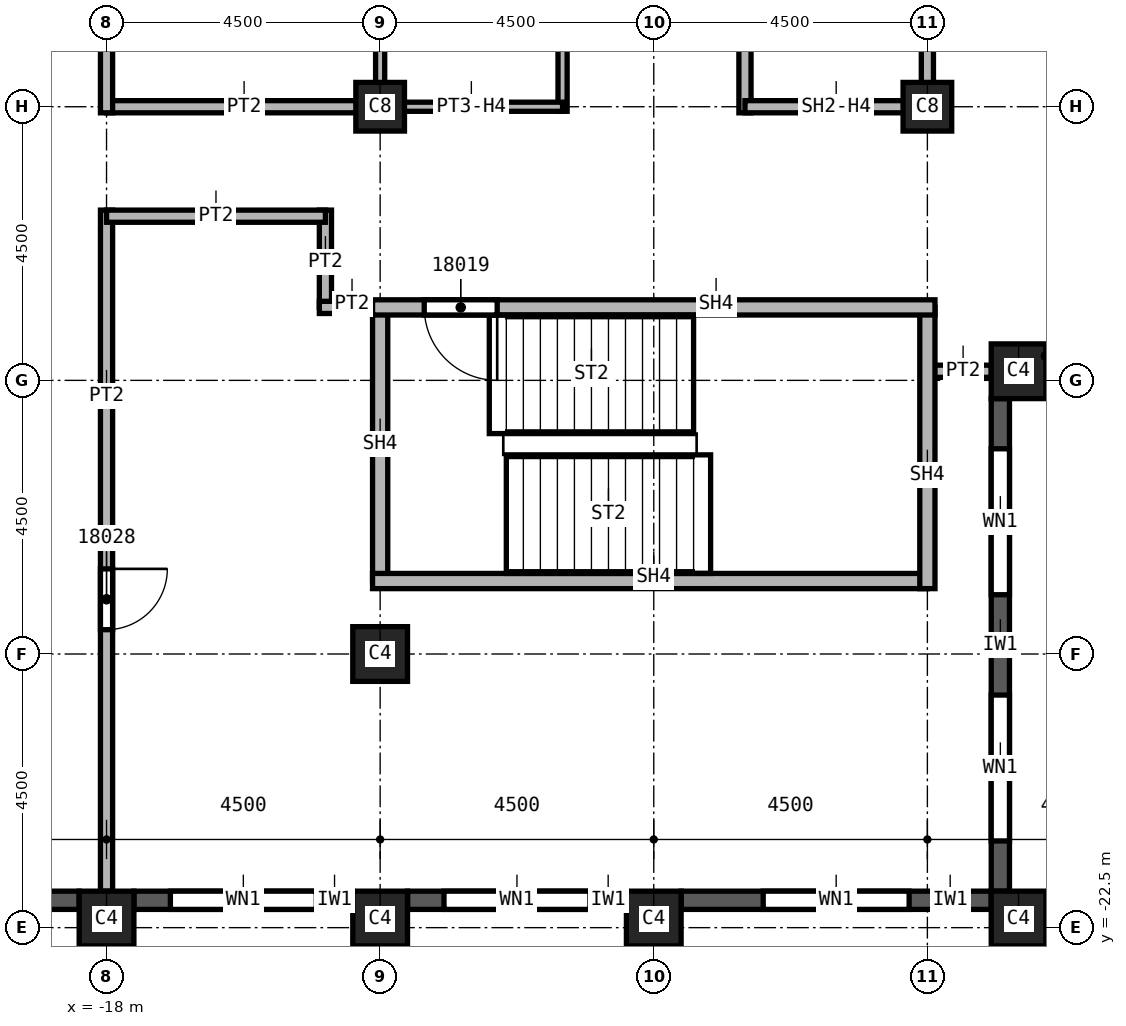
"""IFC4 building model, lengths in metres.
Left out: names, types, materials, properties, quantities, classifications, styles, units other than length and angle.
Written with IfcOpenShell. Run it as: python <this file> out.ifc"""

import sys

from ifc_helpers import new_model, si_unit, direction, frame, frame_2d, origin, origin_2d, place, context, subcontext, project, spatial, rectangle, extrude, element, fill, save


model = new_model("IFC4")
c1 = context("Model", 3, precision=1e-05, world=origin(), true_north=direction((0.0, 1.0)))
c2 = subcontext(c1, "Body", "Model", "MODEL_VIEW")
j1 = project(units=[si_unit("LENGTHUNIT", "METRE"), si_unit("PLANEANGLEUNIT", "RADIAN")], contexts=[c1])
p1 = place(None, origin())
s1 = spatial("IfcSite", under=j1, at=p1, CompositionType="ELEMENT")
p2 = place(p1, origin())
s2 = spatial("IfcBuilding", under=s1, at=p2, CompositionType="ELEMENT")
p3 = place(p2, frame((0.0, 0.0, 266.0)))
s3 = spatial("IfcBuildingStorey", under=s2, at=p3, CompositionType="ELEMENT", Elevation=266.0)
p4 = place(p3, frame((-13.5, -18.0, 0.0), z_axis=(0.0, 0.0, 1.0), x_axis=(1.0, 0.0, 0.0)))
e1 = element("IfcColumn", 1, at=p4, inside=s3, PredefinedType="COLUMN", context=c2, shape_type="SweptSolid", body=[
    extrude(rectangle(XDim=0.9, YDim=0.9, at=origin_2d()), origin(), (0.0, 0.0, 1.0), 3.72),
])
for number, where, z_axis, x_axis in (
    (2, (-4.5, -9.0, 0.0), (0.0, 0.0, 1.0), (1.0, 0.0, 0.0)),
    (3, (-13.5, -9.0, 0.0), (0.0, 0.0, 1.0), (1.0, 0.0, 0.0)),
):
    element("IfcColumn", number, at=place(p3, frame(where, z_axis=z_axis, x_axis=x_axis)), inside=s3, PredefinedType="COLUMN", context=c2, shape_type="SweptSolid", body=[
        extrude(rectangle(XDim=0.8, YDim=0.8, at=origin_2d()), origin(), (0.0, 0.0, 1.0), 3.72),
    ])
for number, where, z_axis, x_axis in (
    (4, (-3.0, -22.35, 0.0), (0.0, 0.0, 1.0), (1.0, 0.0, 0.0)),
    (5, (-9.0, -22.35, 0.0), (0.0, 0.0, 1.0), (1.0, 0.0, 0.0)),
    (6, (-13.5, -22.35, 0.0), (0.0, 0.0, 1.0), (1.0, 0.0, 0.0)),
    (7, (-18.0, -22.35, 0.0), (0.0, 0.0, 1.0), (1.0, 0.0, 0.0)),
    (8, (-3.0, -13.35, 0.0), (0.0, 0.0, 1.0), (1.0, 0.0, 0.0)),
):
    element("IfcColumn", number, at=place(p3, frame(where, z_axis=z_axis, x_axis=x_axis)), inside=s3, PredefinedType="COLUMN", context=c2, shape_type="SweptSolid", body=[
        extrude(rectangle(XDim=0.9, YDim=0.9, at=origin_2d()), origin(), (0.0, 0.0, 1.0), 3.72),
    ])
p5 = place(p3, frame((-22.05, -22.05, 0.0), z_axis=(0.0, 0.0, 1.0), x_axis=(1.0, 0.0, 0.0)))
e9 = element("IfcWall", 9, at=p5, inside=s3, PredefinedType="SOLIDWALL", context=c2, shape_type="SweptSolid", body=[
    extrude(rectangle(XDim=3.6, YDim=0.3, at=frame_2d((1.8, 0.0))), origin(), (0.0, 0.0, 1.0), 3.12),
])
p6 = place(p5, frame((0.775, 0.0, 0.8)))
e10 = element("IfcOpeningElement", 10, at=p6, cuts=e9, PredefinedType="OPENING", context=c2, shape_type="SweptSolid", body=[
    extrude(rectangle(XDim=1.0, YDim=1.95, at=frame_2d((0.5, 0.975))), frame((0.0, 0.15, 0.0), z_axis=(0.0, -1.0, 0.0), x_axis=(1.0, 0.0, 0.0)), (0.0, 0.0, 1.0), 0.3),
])
p7 = place(p5, frame((2.375, 0.0, 0.8)))
e11 = element("IfcOpeningElement", 11, at=p7, cuts=e9, PredefinedType="OPENING", context=c2, shape_type="SweptSolid", body=[
    extrude(rectangle(XDim=0.6, YDim=1.95, at=frame_2d((0.3, 0.975))), frame((0.0, 0.15, 0.0), z_axis=(0.0, -1.0, 0.0), x_axis=(1.0, 0.0, 0.0)), (0.0, 0.0, 1.0), 0.3),
])
p8 = place(p3, frame((-17.55, -22.05, 0.0), z_axis=(0.0, 0.0, 1.0), x_axis=(1.0, 0.0, 0.0)))
e12 = element("IfcWall", 12, at=p8, inside=s3, PredefinedType="SOLIDWALL", context=c2, shape_type="SweptSolid", body=[
    extrude(rectangle(XDim=3.6, YDim=0.3, at=frame_2d((1.8, 0.0))), origin(), (0.0, 0.0, 1.0), 3.12),
])
p9 = place(p8, frame((0.6, 0.0, 0.8)))
e13 = element("IfcOpeningElement", 13, at=p9, cuts=e12, PredefinedType="OPENING", context=c2, shape_type="SweptSolid", body=[
    extrude(rectangle(XDim=2.4, YDim=1.95, at=frame_2d((1.2, 0.975))), frame((0.0, 0.15, 0.0), z_axis=(0.0, -1.0, 0.0), x_axis=(1.0, 0.0, 0.0)), (0.0, 0.0, 1.0), 0.3),
])
p10 = place(p3, frame((-13.05, -22.05, 0.0), z_axis=(0.0, 0.0, 1.0), x_axis=(1.0, 0.0, 0.0)))
e14 = element("IfcWall", 14, at=p10, inside=s3, PredefinedType="SOLIDWALL", context=c2, shape_type="SweptSolid", body=[
    extrude(rectangle(XDim=3.6, YDim=0.3, at=frame_2d((1.8, 0.0))), origin(), (0.0, 0.0, 1.0), 3.12),
])
p11 = place(p10, frame((0.6, 0.0, 0.8)))
e15 = element("IfcOpeningElement", 15, at=p11, cuts=e14, PredefinedType="OPENING", context=c2, shape_type="SweptSolid", body=[
    extrude(rectangle(XDim=2.4, YDim=1.95, at=frame_2d((1.2, 0.975))), frame((0.0, 0.15, 0.0), z_axis=(0.0, -1.0, 0.0), x_axis=(1.0, 0.0, 0.0)), (0.0, 0.0, 1.0), 0.3),
])
p12 = place(p3, frame((-8.55, -22.05, 0.0), z_axis=(0.0, 0.0, 1.0), x_axis=(1.0, 0.0, 0.0)))
e16 = element("IfcWall", 16, at=p12, inside=s3, PredefinedType="SOLIDWALL", context=c2, shape_type="SweptSolid", body=[
    extrude(rectangle(XDim=5.1, YDim=0.3, at=frame_2d((2.55, 0.0))), origin(), (0.0, 0.0, 1.0), 3.12),
])
p13 = place(p12, frame((1.35, 0.0, 0.8)))
e17 = element("IfcOpeningElement", 17, at=p13, cuts=e16, PredefinedType="OPENING", context=c2, shape_type="SweptSolid", body=[
    extrude(rectangle(XDim=2.4, YDim=1.95, at=frame_2d((1.2, 0.975))), frame((0.0, 0.15, 0.0), z_axis=(0.0, -1.0, 0.0), x_axis=(1.0, 0.0, 0.0)), (0.0, 0.0, 1.0), 0.3),
])
p14 = place(p3, frame((-3.3, -21.9, 0.0), z_axis=(0.0, 0.0, 1.0), x_axis=(0.0, 1.0, 0.0)))
e18 = element("IfcWall", 18, at=p14, inside=s3, PredefinedType="SOLIDWALL", context=c2, shape_type="SweptSolid", body=[
    extrude(rectangle(XDim=8.1, YDim=0.3, at=frame_2d((4.05, 0.0))), origin(), (0.0, 0.0, 1.0), 3.12),
])
p15 = place(p14, frame((0.825, 0.0, 0.8)))
e19 = element("IfcOpeningElement", 19, at=p15, cuts=e18, PredefinedType="OPENING", context=c2, shape_type="SweptSolid", body=[
    extrude(rectangle(XDim=2.4, YDim=1.95, at=frame_2d((1.2, 0.975))), frame((0.0, 0.15, 0.0), z_axis=(0.0, -1.0, 0.0), x_axis=(1.0, 0.0, 0.0)), (0.0, 0.0, 1.0), 0.3),
])
p16 = place(p14, frame((4.875, 0.0, 0.8)))
e20 = element("IfcOpeningElement", 20, at=p16, cuts=e18, PredefinedType="OPENING", context=c2, shape_type="SweptSolid", body=[
    extrude(rectangle(XDim=2.4, YDim=1.95, at=frame_2d((1.2, 0.975))), frame((0.0, 0.15, 0.0), z_axis=(0.0, -1.0, 0.0), x_axis=(1.0, 0.0, 0.0)), (0.0, 0.0, 1.0), 0.3),
])
p17 = place(p3, frame((-18.0, -10.7, 0.0), z_axis=(0.0, 0.0, 1.0), x_axis=(0.0, -1.0, 0.0)))
e21 = element("IfcWall", 21, at=p17, inside=s3, PredefinedType="PARTITIONING", context=c2, shape_type="SweptSolid", body=[
    extrude(rectangle(XDim=11.2, YDim=0.2, at=frame_2d((5.6, 0.0))), origin(), (0.0, 0.0, 1.0), 3.72),
])
p18 = place(p17, frame((5.9, 0.0, 0.0)))
e22 = element("IfcOpeningElement", 22, at=p18, cuts=e21, PredefinedType="OPENING", context=c2, shape_type="SweptSolid", body=[
    extrude(rectangle(XDim=1.0, YDim=2.1, at=frame_2d((0.5, 1.05))), frame((0.0, 0.1, 0.0), z_axis=(0.0, -1.0, 0.0), x_axis=(1.0, 0.0, 0.0)), (0.0, 0.0, 1.0), 0.2),
])
p19 = place(p3, frame((-18.0, -9.0, 0.0), z_axis=(0.0, 0.0, 1.0), x_axis=(1.0, 0.0, 0.0)))
e23 = element("IfcWall", 23, at=p19, inside=s3, PredefinedType="PARTITIONING", context=c2, shape_type="SweptSolid", body=[
    extrude(rectangle(XDim=4.5, YDim=0.2, at=frame_2d((2.25, 0.0))), origin(), (0.0, 0.0, 1.0), 3.72),
])
p20 = place(p3, frame((-18.0, 9.1, 0.0), z_axis=(0.0, 0.0, 1.0), x_axis=(0.0, -1.0, 0.0)))
e24 = element("IfcWall", 24, at=p20, inside=s3, PredefinedType="PARTITIONING", context=c2, shape_type="SweptSolid", body=[
    extrude(rectangle(XDim=18.2, YDim=0.2, at=frame_2d((9.1, 0.0))), origin(), (0.0, 0.0, 1.0), 3.72),
])
p21 = place(p20, frame((12.25, 0.0, 0.0)))
e25 = element("IfcOpeningElement", 25, at=p21, cuts=e24, PredefinedType="OPENING", context=c2, shape_type="SweptSolid", body=[
    extrude(rectangle(XDim=1.0, YDim=2.1, at=frame_2d((0.5, 1.05))), frame((0.0, 0.1, 0.0), z_axis=(0.0, -1.0, 0.0), x_axis=(1.0, 0.0, 0.0)), (0.0, 0.0, 1.0), 0.2),
])
p22 = place(p20, frame((2.35, 0.0, 0.0)))
e26 = element("IfcOpeningElement", 26, at=p22, cuts=e24, PredefinedType="OPENING", context=c2, shape_type="SweptSolid", body=[
    extrude(rectangle(XDim=1.0, YDim=2.1, at=frame_2d((0.5, 1.05))), frame((0.0, 0.1, 0.0), z_axis=(0.0, -1.0, 0.0), x_axis=(1.0, 0.0, 0.0)), (0.0, 0.0, 1.0), 0.2),
])
p23 = place(p3, frame((-14.4, -12.3, 0.0), z_axis=(0.0, 0.0, 1.0), x_axis=(0.0, 1.0, 0.0)))
e27 = element("IfcWall", 27, at=p23, inside=s3, PredefinedType="PARTITIONING", context=c2, shape_type="SweptSolid", body=[
    extrude(rectangle(XDim=1.6, YDim=0.2, at=frame_2d((0.8, 0.0))), origin(), (0.0, 0.0, 1.0), 3.72),
])
p24 = place(p3, frame((-14.4, -10.8, 0.0), z_axis=(0.0, 0.0, 1.0), x_axis=(-1.0, 0.0, 0.0)))
e28 = element("IfcWall", 28, at=p24, inside=s3, PredefinedType="PARTITIONING", context=c2, shape_type="SweptSolid", body=[
    extrude(rectangle(XDim=3.6, YDim=0.2, at=frame_2d((1.8, 0.0))), origin(), (0.0, 0.0, 1.0), 3.72),
])
p25 = place(p3, frame((-13.375, -12.3, 0.0), z_axis=(0.0, 0.0, 1.0), x_axis=(-1.0, 0.0, 0.0)))
e29 = element("IfcWall", 29, at=p25, inside=s3, PredefinedType="PARTITIONING", context=c2, shape_type="SweptSolid", body=[
    extrude(rectangle(XDim=1.125, YDim=0.2, at=frame_2d((0.562, 0.0))), origin(), (0.0, 0.0, 1.0), 3.72),
])
p26 = place(p3, frame((-3.45, -13.35, 0.0), z_axis=(0.0, 0.0, 1.0), x_axis=(-1.0, 0.0, 0.0)))
e30 = element("IfcWall", 30, at=p26, inside=s3, PredefinedType="PARTITIONING", context=c2, shape_type="SweptSolid", body=[
    extrude(rectangle(XDim=1.05, YDim=0.2, at=frame_2d((0.525, 0.0))), origin(), (0.0, 0.0, 1.0), 3.72),
])
p27 = place(p3, frame((-7.5, -9.1, 0.0), z_axis=(0.0, 0.0, 1.0), x_axis=(0.0, 1.0, 0.0)))
e31 = element("IfcWall", 31, at=p27, inside=s3, PredefinedType="SOLIDWALL", context=c2, shape_type="SweptSolid", body=[
    extrude(rectangle(XDim=6.225, YDim=0.2, at=frame_2d((3.113, 0.0))), origin(), (0.0, 0.0, 1.0), 3.72),
])
p28 = place(p3, frame((-4.5, -9.0, 0.0), z_axis=(0.0, 0.0, 1.0), x_axis=(-1.0, 0.0, 0.0)))
e32 = element("IfcWall", 32, at=p28, inside=s3, PredefinedType="SOLIDWALL", context=c2, shape_type="SweptSolid", body=[
    extrude(rectangle(XDim=3.0, YDim=0.2, at=frame_2d((1.5, 0.0))), origin(), (0.0, 0.0, 1.0), 3.042),
])
p29 = place(p3, frame((-4.5, 0.0, 0.0), z_axis=(0.0, 0.0, 1.0), x_axis=(0.0, -1.0, 0.0)))
e33 = element("IfcWall", 33, at=p29, inside=s3, PredefinedType="SOLIDWALL", context=c2, shape_type="SweptSolid", body=[
    extrude(rectangle(XDim=9.1, YDim=0.2, at=frame_2d((4.55, 0.0))), origin(), (0.0, 0.0, 1.0), 3.042),
])
p30 = place(p29, frame((3.25, 0.0, 0.0)))
e34 = element("IfcOpeningElement", 34, at=p30, cuts=e33, PredefinedType="OPENING", context=c2, shape_type="SweptSolid", body=[
    extrude(rectangle(XDim=1.1, YDim=2.1, at=frame_2d((0.55, 1.05))), frame((0.0, 0.1, 0.0), z_axis=(0.0, -1.0, 0.0), x_axis=(1.0, 0.0, 0.0)), (0.0, 0.0, 1.0), 0.2),
])
p31 = place(p29, frame((1.6, 0.0, 0.0)))
e35 = element("IfcOpeningElement", 35, at=p31, cuts=e33, PredefinedType="OPENING", context=c2, shape_type="SweptSolid", body=[
    extrude(rectangle(XDim=1.1, YDim=2.1, at=frame_2d((0.55, 1.05))), frame((0.0, 0.1, 0.0), z_axis=(0.0, -1.0, 0.0), x_axis=(1.0, 0.0, 0.0)), (0.0, 0.0, 1.0), 0.2),
])
p32 = place(p3, frame((-13.5, -16.8, 0.0), z_axis=(0.0, 0.0, 1.0), x_axis=(0.0, 1.0, 0.0)))
e36 = element("IfcWall", 36, at=p32, inside=s3, PredefinedType="SOLIDWALL", context=c2, shape_type="SweptSolid", body=[
    extrude(rectangle(XDim=4.5, YDim=0.25, at=frame_2d((2.25, 0.0))), origin(), (0.0, 0.0, 1.0), 3.72),
])
p33 = place(p3, frame((-4.5, -16.8, 0.0), z_axis=(0.0, 0.0, 1.0), x_axis=(-1.0, 0.0, 0.0)))
e37 = element("IfcWall", 37, at=p33, inside=s3, PredefinedType="SOLIDWALL", context=c2, shape_type="SweptSolid", body=[
    extrude(rectangle(XDim=9.125, YDim=0.25, at=frame_2d((4.562, 0.0))), origin(), (0.0, 0.0, 1.0), 3.72),
])
p34 = place(p3, frame((-4.5, -12.3, 0.0), z_axis=(0.0, 0.0, 1.0), x_axis=(0.0, -1.0, 0.0)))
e38 = element("IfcWall", 38, at=p34, inside=s3, PredefinedType="SOLIDWALL", context=c2, shape_type="SweptSolid", body=[
    extrude(rectangle(XDim=4.625, YDim=0.25, at=frame_2d((2.312, 0.0))), origin(), (0.0, 0.0, 1.0), 3.72),
])
p35 = place(p3, frame((-4.375, -12.3, 0.0), z_axis=(0.0, 0.0, 1.0), x_axis=(-1.0, 0.0, 0.0)))
e39 = element("IfcWall", 39, at=p35, inside=s3, PredefinedType="SOLIDWALL", context=c2, shape_type="SweptSolid", body=[
    extrude(rectangle(XDim=9.25, YDim=0.25, at=frame_2d((4.625, 0.0))), origin(), (0.0, 0.0, 1.0), 3.72),
])
p36 = place(p35, frame((7.2, 0.0, 0.0)))
e40 = element("IfcOpeningElement", 40, at=p36, cuts=e39, PredefinedType="OPENING", context=c2, shape_type="SweptSolid", body=[
    extrude(rectangle(XDim=1.2, YDim=2.1, at=frame_2d((0.6, 1.05))), frame((0.0, 0.125, 0.0), z_axis=(0.0, -1.0, 0.0), x_axis=(1.0, 0.0, 0.0)), (0.0, 0.0, 1.0), 0.25),
])
p37 = place(p3, frame((-13.5, -9.1, 0.0), z_axis=(0.0, 0.0, 1.0), x_axis=(0.0, 1.0, 0.0)))
e41 = element("IfcWall", 41, at=p37, inside=s3, PredefinedType="PARTITIONING", context=c2, shape_type="SweptSolid", body=[
    extrude(rectangle(XDim=4.6, YDim=0.15, at=frame_2d((2.3, 0.0))), origin(), (0.0, 0.0, 1.0), 3.042),
])
p38 = place(p3, frame((-10.5, -9.075, 0.0), z_axis=(0.0, 0.0, 1.0), x_axis=(0.0, 1.0, 0.0)))
e42 = element("IfcWall", 42, at=p38, inside=s3, PredefinedType="PARTITIONING", context=c2, shape_type="SweptSolid", body=[
    extrude(rectangle(XDim=4.65, YDim=0.15, at=frame_2d((2.325, 0.0))), origin(), (0.0, 0.0, 1.0), 3.72),
])
p39 = place(p38, frame((2.8, 0.0, 0.0)))
e43 = element("IfcOpeningElement", 43, at=p39, cuts=e42, PredefinedType="OPENING", context=c2, shape_type="SweptSolid", body=[
    extrude(rectangle(XDim=0.9, YDim=2.1, at=frame_2d((0.45, 1.05))), frame((0.0, 0.075, 0.0), z_axis=(0.0, -1.0, 0.0), x_axis=(1.0, 0.0, 0.0)), (0.0, 0.0, 1.0), 0.15),
])
p40 = place(p3, frame((-10.5, -9.0, 0.0), z_axis=(0.0, 0.0, 1.0), x_axis=(-1.0, 0.0, 0.0)))
e44 = element("IfcWall", 44, at=p40, inside=s3, PredefinedType="PARTITIONING", context=c2, shape_type="SweptSolid", body=[
    extrude(rectangle(XDim=3.075, YDim=0.15, at=frame_2d((1.538, 0.0))), origin(), (0.0, 0.0, 1.0), 3.042),
])
p41 = place(p9, origin())
e45 = element("IfcWindow", 45, at=p41, inside=s3, PartitioningType="SINGLE_PANEL", PredefinedType="WINDOW", context=c2, shape_type="SweptSolid", body=[
    extrude(rectangle(XDim=2.4, YDim=1.95, at=frame_2d((1.2, 0.975))), frame((0.0, 0.03, 0.0), z_axis=(0.0, -1.0, 0.0), x_axis=(1.0, 0.0, 0.0)), (0.0, 0.0, 1.0), 0.06),
])
fill(e13, e45)
p42 = place(p11, origin())
e46 = element("IfcWindow", 46, at=p42, inside=s3, PartitioningType="SINGLE_PANEL", PredefinedType="WINDOW", context=c2, shape_type="SweptSolid", body=[
    extrude(rectangle(XDim=2.4, YDim=1.95, at=frame_2d((1.2, 0.975))), frame((0.0, 0.03, 0.0), z_axis=(0.0, -1.0, 0.0), x_axis=(1.0, 0.0, 0.0)), (0.0, 0.0, 1.0), 0.06),
])
fill(e15, e46)
p43 = place(p13, origin())
e47 = element("IfcWindow", 47, at=p43, inside=s3, PartitioningType="SINGLE_PANEL", PredefinedType="WINDOW", context=c2, shape_type="SweptSolid", body=[
    extrude(rectangle(XDim=2.4, YDim=1.95, at=frame_2d((1.2, 0.975))), frame((0.0, 0.03, 0.0), z_axis=(0.0, -1.0, 0.0), x_axis=(1.0, 0.0, 0.0)), (0.0, 0.0, 1.0), 0.06),
])
fill(e17, e47)
p44 = place(p15, origin())
e48 = element("IfcWindow", 48, at=p44, inside=s3, PartitioningType="SINGLE_PANEL", PredefinedType="WINDOW", context=c2, shape_type="SweptSolid", body=[
    extrude(rectangle(XDim=2.4, YDim=1.95, at=frame_2d((1.2, 0.975))), frame((0.0, 0.03, 0.0), z_axis=(0.0, -1.0, 0.0), x_axis=(1.0, 0.0, 0.0)), (0.0, 0.0, 1.0), 0.06),
])
fill(e19, e48)
p45 = place(p16, origin())
e49 = element("IfcWindow", 49, at=p45, inside=s3, PartitioningType="SINGLE_PANEL", PredefinedType="WINDOW", context=c2, shape_type="SweptSolid", body=[
    extrude(rectangle(XDim=2.4, YDim=1.95, at=frame_2d((1.2, 0.975))), frame((0.0, 0.03, 0.0), z_axis=(0.0, -1.0, 0.0), x_axis=(1.0, 0.0, 0.0)), (0.0, 0.0, 1.0), 0.06),
])
fill(e20, e49)
p46 = place(p36, origin())
e50 = element("IfcDoor", 50, at=p46, inside=s3, OperationType="SINGLE_SWING_RIGHT", PredefinedType="DOOR", context=c2, shape_type="SweptSolid", body=[
    extrude(rectangle(XDim=1.2, YDim=2.1, at=frame_2d((0.6, 1.05))), frame((0.0, 0.025, 0.0), z_axis=(0.0, -1.0, 0.0), x_axis=(1.0, 0.0, 0.0)), (0.0, 0.0, 1.0), 0.05),
])
fill(e40, e50)
p47 = place(p18, origin())
e51 = element("IfcDoor", 51, at=p47, inside=s3, OperationType="SINGLE_SWING_LEFT", PredefinedType="DOOR", context=c2, shape_type="SweptSolid", body=[
    extrude(rectangle(XDim=1.0, YDim=2.1, at=frame_2d((0.5, 1.05))), frame((0.0, 0.025, 0.0), z_axis=(0.0, -1.0, 0.0), x_axis=(1.0, 0.0, 0.0)), (0.0, 0.0, 1.0), 0.05),
])
fill(e22, e51)
save(model, sys.argv[1])
